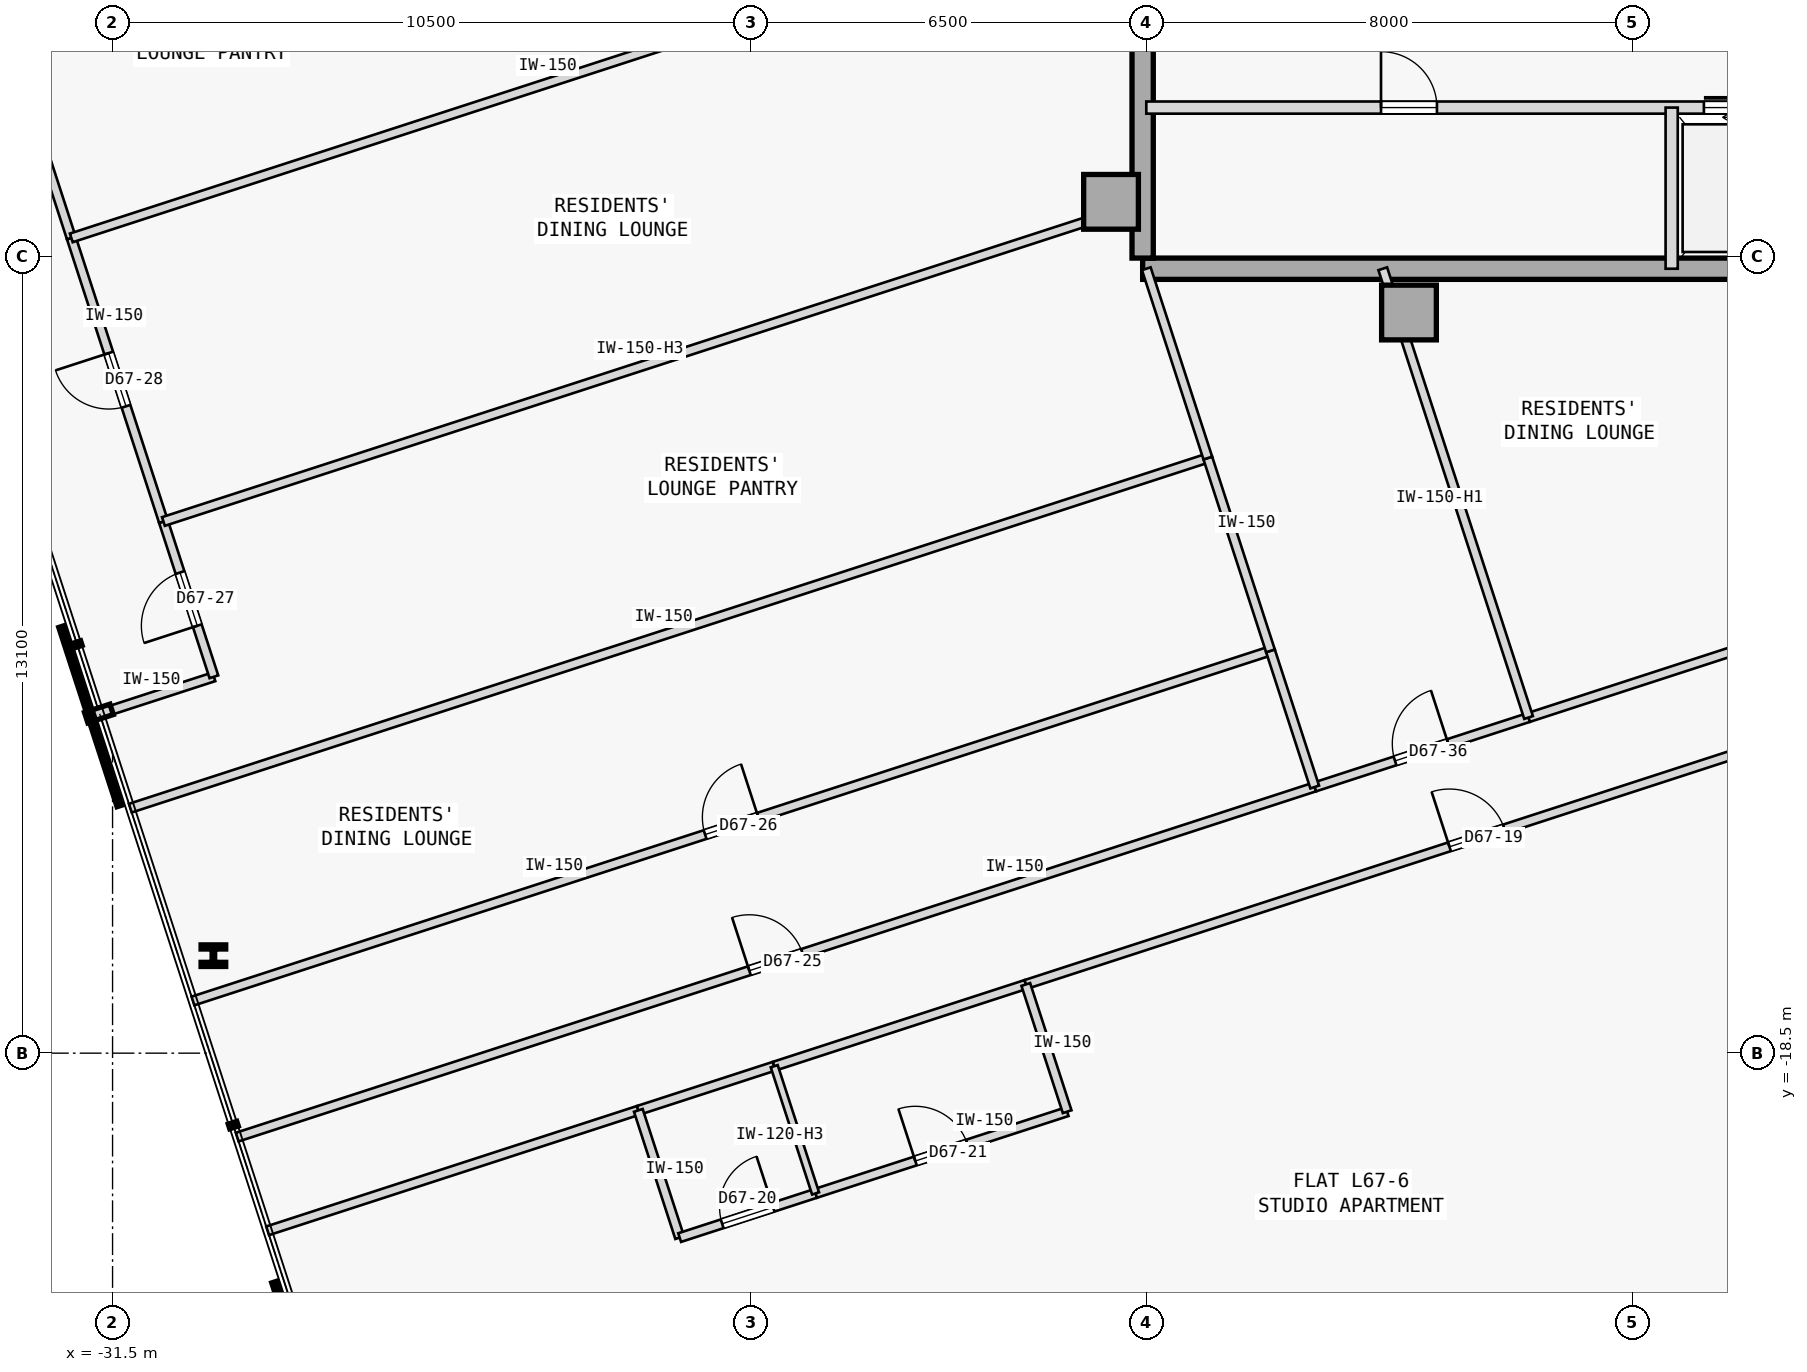
"""IFC4 building model, lengths in metres.
Left out: names, types, materials, properties, quantities, classifications, styles, units other than length and angle.
Written with IfcOpenShell. Run it as: python <this file> out.ifc"""

import sys

from ifc_helpers import new_model, si_unit, direction, frame, frame_2d, origin, origin_2d, place, context, subcontext, project, spatial, rectangle, i_section, extrude, element, fill, save


model = new_model("IFC4")
c1 = context("Model", 3, precision=1e-05, world=origin(), true_north=direction((0.0, 1.0)))
c2 = subcontext(c1, "Body", "Model", "MODEL_VIEW")
j1 = project(units=[si_unit("LENGTHUNIT", "METRE"), si_unit("PLANEANGLEUNIT", "RADIAN")], contexts=[c1])
p1 = place(None, origin())
s1 = spatial("IfcSite", under=j1, at=p1, CompositionType="ELEMENT")
p2 = place(p1, origin())
s2 = spatial("IfcBuilding", under=s1, at=p2, CompositionType="ELEMENT")
p3 = place(p2, frame((0.0, 0.0, 251.1)))
s3 = spatial("IfcBuildingStorey", under=s2, at=p3, CompositionType="ELEMENT", Elevation=251.1)
for number, where, z_axis, x_axis in (
    (1, (-15.08, -4.5, 0.0), (0.0, 0.0, 1.0), (1.0, 0.0, 0.0)),
    (2, (-10.18, -6.32, 0.0), (0.0, 0.0, 1.0), (1.0, 0.0, 0.0)),
):
    element("IfcColumn", number, at=place(p3, frame(where, z_axis=z_axis, x_axis=x_axis)), inside=s3, PredefinedType="COLUMN", context=c2, shape_type="SweptSolid", body=[
        extrude(rectangle(XDim=0.9, YDim=0.9, at=origin_2d()), origin(), (0.0, 0.0, 1.0), 3.35),
    ])
p4 = place(p3, frame((-14.56, -5.6, 0.0), z_axis=(0.0, 0.0, 1.0), x_axis=(1.0, 0.0, 0.0)))
e3 = element("IfcWall", 3, at=p4, inside=s3, PredefinedType="SHEAR", context=c2, shape_type="SweptSolid", body=[
    extrude(rectangle(XDim=10.86, YDim=0.35, at=frame_2d((5.43, 0.0))), origin(), (0.0, 0.0, 1.0), 2.95),
])
p5 = place(p3, frame((-14.56, -5.425, 0.0), z_axis=(0.0, 0.0, 1.0), x_axis=(0.0, 1.0, 0.0)))
e4 = element("IfcWall", 4, at=p5, inside=s3, PredefinedType="SHEAR", context=c2, shape_type="SweptSolid", body=[
    extrude(rectangle(XDim=10.85, YDim=0.35, at=frame_2d((5.425, 0.0))), origin(), (0.0, 0.0, 1.0), 2.95),
])
p6 = place(p3, frame((-29.842, -16.897, 0.0), z_axis=(0.0, 0.0, 1.0), x_axis=(1.0, 0.0, 0.0)))
e5 = element("IfcColumn", 5, at=p6, inside=s3, PredefinedType="COLUMN", context=c2, shape_type="SweptSolid", body=[
    extrude(i_section(OverallWidth=0.405, OverallDepth=0.355, WebThickness=0.042, FlangeThickness=0.068, FilletRadius=0.015, at=origin_2d()), origin(), (0.0, 0.0, 1.0), 3.35),
])
p7 = place(p3, frame((-14.5, -2.95, 0.0), z_axis=(0.0, 0.0, 1.0), x_axis=(1.0, 0.0, 0.0)))
e6 = element("IfcWall", 6, at=p7, inside=s3, PredefinedType="STANDARD", context=c2, shape_type="SweptSolid", body=[
    extrude(rectangle(XDim=10.8, YDim=0.2, at=frame_2d((5.4, 0.0))), origin(), (0.0, 0.0, 1.0), 2.95),
])
p8 = place(p7, frame((9.17, 0.0, 0.0)))
e7 = element("IfcOpeningElement", 7, at=p8, cuts=e6, PredefinedType="OPENING", context=c2, shape_type="SweptSolid", body=[
    extrude(rectangle(XDim=1.1, YDim=2.15, at=frame_2d((0.55, 1.075))), frame((0.0, 0.11, 0.0), z_axis=(0.0, -1.0, 0.0), x_axis=(1.0, 0.0, 0.0)), (0.0, 0.0, 1.0), 0.22),
])
p9 = place(p7, frame((3.86, 0.0, 0.0)))
e8 = element("IfcOpeningElement", 8, at=p9, cuts=e6, PredefinedType="OPENING", context=c2, shape_type="SweptSolid", body=[
    extrude(rectangle(XDim=0.92, YDim=2.15, at=frame_2d((0.46, 1.075))), frame((0.0, 0.11, 0.0), z_axis=(0.0, -1.0, 0.0), x_axis=(1.0, 0.0, 0.0)), (0.0, 0.0, 1.0), 0.22),
])
p10 = place(p3, frame((-5.86, -5.6, 0.0), z_axis=(0.0, 0.0, 1.0), x_axis=(0.0, 1.0, 0.0)))
e9 = element("IfcWall", 9, at=p10, inside=s3, PredefinedType="STANDARD", context=c2, shape_type="SweptSolid", body=[
    extrude(rectangle(XDim=2.65, YDim=0.2, at=frame_2d((1.325, 0.0))), origin(), (0.0, 0.0, 1.0), 2.95),
])
p11 = place(p3, frame((-28.95, -21.421, 0.0), z_axis=(0.0, 0.0, 1.0), x_axis=(0.951048062645, 0.309043010825, 0.0)))
e10 = element("IfcWall", 10, at=p11, inside=s3, PredefinedType="PARTITIONING", context=c2, shape_type="SweptSolid", body=[
    extrude(rectangle(XDim=6.41, YDim=0.15, at=frame_2d((3.205, 0.0))), origin(), (0.0, 0.0, 1.0), 2.95),
])
p12 = place(p3, frame((-16.482, -17.37, 0.0), z_axis=(0.0, 0.0, 1.0), x_axis=(0.9510563751, 0.309017428929, 0.0)))
e11 = element("IfcWall", 11, at=p12, inside=s3, PredefinedType="PARTITIONING", context=c2, shape_type="SweptSolid", body=[
    extrude(rectangle(XDim=15.602, YDim=0.15, at=frame_2d((7.801, 0.0))), origin(), (0.0, 0.0, 1.0), 2.95),
])
p13 = place(p12, frame((7.326, 0.0, 0.0)))
e12 = element("IfcOpeningElement", 12, at=p13, cuts=e11, PredefinedType="OPENING", context=c2, shape_type="SweptSolid", body=[
    extrude(rectangle(XDim=0.95, YDim=2.15, at=frame_2d((0.475, 1.075))), frame((0.0, 0.085, 0.0), z_axis=(0.0, -1.0, 0.0), x_axis=(1.0, 0.0, 0.0)), (0.0, 0.0, 1.0), 0.17),
])
p14 = place(p3, frame((-22.854, -19.44, 0.0), z_axis=(0.0, 0.0, 1.0), x_axis=(0.951076048914, 0.308956872689, 0.0)))
e13 = element("IfcWall", 13, at=p14, inside=s3, PredefinedType="PARTITIONING", context=c2, shape_type="SweptSolid", body=[
    extrude(rectangle(XDim=2.35, YDim=0.15, at=frame_2d((1.175, 0.0))), origin(), (0.0, 0.0, 1.0), 2.95),
])
p15 = place(p3, frame((-20.619, -18.714, 0.0), z_axis=(0.0, 0.0, 1.0), x_axis=(0.951052627573, 0.309028962374, 0.0)))
e14 = element("IfcWall", 14, at=p15, inside=s3, PredefinedType="PARTITIONING", context=c2, shape_type="SweptSolid", body=[
    extrude(rectangle(XDim=4.35, YDim=0.15, at=frame_2d((2.175, 0.0))), origin(), (0.0, 0.0, 1.0), 2.95),
])
p16 = place(p3, frame((-29.45, -19.881, 0.0), z_axis=(0.0, 0.0, 1.0), x_axis=(0.95105650271, 0.309017036186, 0.0)))
e15 = element("IfcWall", 15, at=p16, inside=s3, PredefinedType="PARTITIONING", context=c2, shape_type="SweptSolid", body=[
    extrude(rectangle(XDim=18.632, YDim=0.15, at=frame_2d((9.316, 0.0))), origin(), (0.0, 0.0, 1.0), 2.95),
])
p17 = place(p16, frame((8.856, 0.0, 0.0)))
e16 = element("IfcOpeningElement", 16, at=p17, cuts=e15, PredefinedType="OPENING", context=c2, shape_type="SweptSolid", body=[
    extrude(rectangle(XDim=0.92, YDim=2.15, at=frame_2d((0.46, 1.075))), frame((0.0, 0.085, 0.0), z_axis=(0.0, -1.0, 0.0), x_axis=(1.0, 0.0, 0.0)), (0.0, 0.0, 1.0), 0.17),
])
p18 = place(p3, frame((-31.712, -12.921, 0.0), z_axis=(0.0, 0.0, 1.0), x_axis=(0.951054051148, 0.309024581215, 0.0)))
e17 = element("IfcWall", 17, at=p18, inside=s3, PredefinedType="PARTITIONING", context=c2, shape_type="SweptSolid", body=[
    extrude(rectangle(XDim=1.975, YDim=0.15, at=frame_2d((0.988, 0.0))), origin(), (0.0, 0.0, 1.0), 2.95),
])
p19 = place(p3, frame((-29.833, -12.311, 0.0), z_axis=(0.0, 0.0, 1.0), x_axis=(-0.309044953986, 0.951047431213, 0.0)))
e18 = element("IfcWall", 18, at=p19, inside=s3, PredefinedType="PARTITIONING", context=c2, shape_type="SweptSolid", body=[
    extrude(rectangle(XDim=2.685, YDim=0.15, at=frame_2d((1.343, 0.0))), origin(), (0.0, 0.0, 1.0), 2.95),
])
p20 = place(p19, frame((0.883, 0.0, 0.0)))
e19 = element("IfcOpeningElement", 19, at=p20, cuts=e18, PredefinedType="OPENING", context=c2, shape_type="SweptSolid", body=[
    extrude(rectangle(XDim=0.92, YDim=2.15, at=frame_2d((0.46, 1.075))), frame((0.0, 0.085, 0.0), z_axis=(0.0, -1.0, 0.0), x_axis=(1.0, 0.0, 0.0)), (0.0, 0.0, 1.0), 0.17),
])
p21 = place(p3, frame((-30.663, -9.757, 0.0), z_axis=(0.0, 0.0, 1.0), x_axis=(-0.309019653166, 0.951055652397, 0.0)))
e20 = element("IfcWall", 20, at=p21, inside=s3, PredefinedType="PARTITIONING", context=c2, shape_type="SweptSolid", body=[
    extrude(rectangle(XDim=4.904, YDim=0.15, at=frame_2d((2.452, 0.0))), origin(), (0.0, 0.0, 1.0), 2.95),
])
p22 = place(p21, frame((1.992, 0.0, 0.0)))
e21 = element("IfcOpeningElement", 21, at=p22, cuts=e20, PredefinedType="OPENING", context=c2, shape_type="SweptSolid", body=[
    extrude(rectangle(XDim=0.92, YDim=2.15, at=frame_2d((0.46, 1.075))), frame((0.0, 0.085, 0.0), z_axis=(0.0, -1.0, 0.0), x_axis=(1.0, 0.0, 0.0)), (0.0, 0.0, 1.0), 0.17),
])
p23 = place(p3, frame((-32.179, -5.093, 0.0), z_axis=(0.0, 0.0, 1.0), x_axis=(-0.309014532869, 0.951057316083, 0.0)))
e22 = element("IfcWall", 22, at=p23, inside=s3, PredefinedType="PARTITIONING", context=c2, shape_type="SweptSolid", body=[
    extrude(rectangle(XDim=4.707, YDim=0.15, at=frame_2d((2.354, 0.0))), origin(), (0.0, 0.0, 1.0), 2.95),
])
p24 = place(p3, frame((-11.73, -14.123, 0.0), z_axis=(0.0, 0.0, 1.0), x_axis=(0.951052502763, 0.309029346483, 0.0)))
e23 = element("IfcWall", 23, at=p24, inside=s3, PredefinedType="PARTITIONING", context=c2, shape_type="SweptSolid", body=[
    extrude(rectangle(XDim=3.698, YDim=0.15, at=frame_2d((1.849, 0.0))), origin(), (0.0, 0.0, 1.0), 2.95),
])
p25 = place(p24, frame((1.389, 0.0, 0.0)))
e24 = element("IfcOpeningElement", 24, at=p25, cuts=e23, PredefinedType="OPENING", context=c2, shape_type="SweptSolid", body=[
    extrude(rectangle(XDim=0.92, YDim=2.15, at=frame_2d((0.46, 1.075))), frame((0.0, 0.085, 0.0), z_axis=(0.0, -1.0, 0.0), x_axis=(1.0, 0.0, 0.0)), (0.0, 0.0, 1.0), 0.17),
])
p26 = place(p3, frame((-8.213, -12.98, 0.0), z_axis=(0.0, 0.0, 1.0), x_axis=(0.951058260096, 0.309011627456, 0.0)))
e25 = element("IfcWall", 25, at=p26, inside=s3, PredefinedType="PARTITIONING", context=c2, shape_type="SweptSolid", body=[
    extrude(rectangle(XDim=4.746, YDim=0.15, at=frame_2d((2.373, 0.0))), origin(), (0.0, 0.0, 1.0), 2.95),
])
p27 = place(p3, frame((-22.174, -21.533, 0.0), z_axis=(0.0, 0.0, 1.0), x_axis=(-0.309028364152, 0.951052821956, 0.0)))
e26 = element("IfcWall", 26, at=p27, inside=s3, PredefinedType="PARTITIONING", context=c2, shape_type="SweptSolid", body=[
    extrude(rectangle(XDim=2.2, YDim=0.15, at=frame_2d((1.1, 0.0))), origin(), (0.0, 0.0, 1.0), 2.95),
])
p28 = place(p3, frame((-22.174, -21.533, 0.0), z_axis=(0.0, 0.0, 1.0), x_axis=(0.951045519245, 0.309050837767, 0.0)))
e27 = element("IfcWall", 27, at=p28, inside=s3, PredefinedType="PARTITIONING", context=c2, shape_type="SweptSolid", body=[
    extrude(rectangle(XDim=2.35, YDim=0.15, at=frame_2d((1.175, 0.0))), origin(), (0.0, 0.0, 1.0), 2.95),
])
p29 = place(p28, frame((0.735, 0.0, 0.0)))
e28 = element("IfcOpeningElement", 28, at=p29, cuts=e27, PredefinedType="OPENING", context=c2, shape_type="SweptSolid", body=[
    extrude(rectangle(XDim=0.88, YDim=2.15, at=frame_2d((0.44, 1.075))), frame((0.0, 0.085, 0.0), z_axis=(0.0, -1.0, 0.0), x_axis=(1.0, 0.0, 0.0)), (0.0, 0.0, 1.0), 0.17),
])
p30 = place(p3, frame((-19.939, -20.807, 0.0), z_axis=(0.0, 0.0, 1.0), x_axis=(0.951052627573, 0.309028962374, 0.0)))
e29 = element("IfcWall", 29, at=p30, inside=s3, PredefinedType="PARTITIONING", context=c2, shape_type="SweptSolid", body=[
    extrude(rectangle(XDim=4.35, YDim=0.15, at=frame_2d((2.175, 0.0))), origin(), (0.0, 0.0, 1.0), 2.95),
])
p31 = place(p30, frame((1.725, 0.0, 0.0)))
e30 = element("IfcOpeningElement", 30, at=p31, cuts=e29, PredefinedType="OPENING", context=c2, shape_type="SweptSolid", body=[
    extrude(rectangle(XDim=0.9, YDim=2.15, at=frame_2d((0.45, 1.075))), frame((0.0, 0.085, 0.0), z_axis=(0.0, -1.0, 0.0), x_axis=(1.0, 0.0, 0.0)), (0.0, 0.0, 1.0), 0.17),
])
p32 = place(p3, frame((-15.802, -19.462, 0.0), z_axis=(0.0, 0.0, 1.0), x_axis=(-0.309060979314, 0.951042223598, 0.0)))
e31 = element("IfcWall", 31, at=p32, inside=s3, PredefinedType="PARTITIONING", context=c2, shape_type="SweptSolid", body=[
    extrude(rectangle(XDim=2.2, YDim=0.15, at=frame_2d((1.1, 0.0))), origin(), (0.0, 0.0, 1.0), 2.95),
])
p33 = place(p3, frame((-19.939, -20.807, 0.0), z_axis=(0.0, 0.0, 1.0), x_axis=(-0.309060979314, 0.951042223598, 0.0)))
e32 = element("IfcWall", 32, at=p33, inside=s3, PredefinedType="PARTITIONING", context=c2, shape_type="SweptSolid", body=[
    extrude(rectangle(XDim=2.2, YDim=0.12, at=frame_2d((1.1, 0.0))), origin(), (0.0, 0.0, 1.0), 2.17),
])
p34 = place(p3, frame((-30.178, -17.642, 0.0), z_axis=(0.0, 0.0, 1.0), x_axis=(0.95105650271, 0.309017036186, 0.0)))
e33 = element("IfcWall", 33, at=p34, inside=s3, PredefinedType="PARTITIONING", context=c2, shape_type="SweptSolid", body=[
    extrude(rectangle(XDim=18.632, YDim=0.15, at=frame_2d((9.316, 0.0))), origin(), (0.0, 0.0, 1.0), 2.95),
])
p35 = place(p34, frame((8.856, 0.0, 0.0)))
e34 = element("IfcOpeningElement", 34, at=p35, cuts=e33, PredefinedType="OPENING", context=c2, shape_type="SweptSolid", body=[
    extrude(rectangle(XDim=0.92, YDim=2.15, at=frame_2d((0.46, 1.075))), frame((0.0, 0.085, 0.0), z_axis=(0.0, -1.0, 0.0), x_axis=(1.0, 0.0, 0.0)), (0.0, 0.0, 1.0), 0.17),
])
p36 = place(p3, frame((-11.73, -14.123, 0.0), z_axis=(0.0, 0.0, 1.0), x_axis=(-0.309062621189, 0.951041690035, 0.0)))
e35 = element("IfcWall", 35, at=p36, inside=s3, PredefinedType="PARTITIONING", context=c2, shape_type="SweptSolid", body=[
    extrude(rectangle(XDim=2.354, YDim=0.15, at=frame_2d((1.177, 0.0))), origin(), (0.0, 0.0, 1.0), 2.95),
])
p37 = place(p3, frame((-31.208, -14.471, 0.0), z_axis=(0.0, 0.0, 1.0), x_axis=(0.951057753948, 0.309013185244, 0.0)))
e36 = element("IfcWall", 36, at=p37, inside=s3, PredefinedType="PARTITIONING", context=c2, shape_type="SweptSolid", body=[
    extrude(rectangle(XDim=18.632, YDim=0.15, at=frame_2d((9.316, 0.0))), origin(), (0.0, 0.0, 1.0), 2.95),
])
p38 = place(p3, frame((-12.458, -11.884, 0.0), z_axis=(0.0, 0.0, 1.0), x_axis=(-0.308946982245, 0.951079261766, 0.0)))
e37 = element("IfcWall", 37, at=p38, inside=s3, PredefinedType="PARTITIONING", context=c2, shape_type="SweptSolid", body=[
    extrude(rectangle(XDim=3.334, YDim=0.15, at=frame_2d((1.667, 0.0))), origin(), (0.0, 0.0, 1.0), 2.95),
])
p39 = place(p3, frame((-30.663, -9.757, 0.0), z_axis=(0.0, 0.0, 1.0), x_axis=(0.951058192995, 0.309011833974, 0.0)))
e38 = element("IfcWall", 38, at=p39, inside=s3, PredefinedType="PARTITIONING", context=c2, shape_type="SweptSolid", body=[
    extrude(rectangle(XDim=16.657, YDim=0.15, at=frame_2d((8.329, 0.0))), origin(), (0.0, 0.0, 1.0), 2.17),
])
p40 = place(p3, frame((-13.488, -8.713, 0.0), z_axis=(0.0, 0.0, 1.0), x_axis=(-0.309082700143, 0.951035164687, 0.0)))
e39 = element("IfcWall", 39, at=p40, inside=s3, PredefinedType="PARTITIONING", context=c2, shape_type="SweptSolid", body=[
    extrude(rectangle(XDim=3.274, YDim=0.15, at=frame_2d((1.637, 0.0))), origin(), (0.0, 0.0, 1.0), 2.95),
])
p41 = place(p3, frame((-32.179, -5.093, 0.0), z_axis=(0.0, 0.0, 1.0), x_axis=(0.951053885426, 0.309025091239, 0.0)))
e40 = element("IfcWall", 40, at=p41, inside=s3, PredefinedType="PARTITIONING", context=c2, shape_type="SweptSolid", body=[
    extrude(rectangle(XDim=16.657, YDim=0.15, at=frame_2d((8.329, 0.0))), origin(), (0.0, 0.0, 1.0), 2.95),
])
p42 = place(p3, frame((-8.213, -12.98, 0.0), z_axis=(0.0, 0.0, 1.0), x_axis=(-0.309017065592, 0.951056493155, 0.0)))
e41 = element("IfcWall", 41, at=p42, inside=s3, PredefinedType="PARTITIONING", context=c2, shape_type="SweptSolid", body=[
    extrude(rectangle(XDim=7.76, YDim=0.15, at=frame_2d((3.88, 0.0))), origin(), (0.0, 0.0, 1.0), 2.5),
])
p43 = place(p8, origin())
e42 = element("IfcDoor", 42, at=p43, inside=s3, OperationType="SLIDING_TO_RIGHT", PredefinedType="DOOR", context=c2, shape_type="SweptSolid", body=[
    extrude(rectangle(XDim=1.1, YDim=2.15, at=frame_2d((0.55, 1.075))), frame((0.0, 0.025, 0.0), z_axis=(0.0, -1.0, 0.0), x_axis=(1.0, 0.0, 0.0)), (0.0, 0.0, 1.0), 0.05),
])
fill(e7, e42)
p44 = place(p9, origin())
e43 = element("IfcDoor", 43, at=p44, inside=s3, OperationType="SINGLE_SWING_LEFT", PredefinedType="DOOR", context=c2, shape_type="SweptSolid", body=[
    extrude(rectangle(XDim=0.92, YDim=2.15, at=frame_2d((0.46, 1.075))), frame((0.0, 0.025, 0.0), z_axis=(0.0, -1.0, 0.0), x_axis=(1.0, 0.0, 0.0)), (0.0, 0.0, 1.0), 0.05),
])
fill(e8, e43)
p45 = place(p13, origin())
e44 = element("IfcDoor", 44, at=p45, inside=s3, OperationType="SINGLE_SWING_LEFT", PredefinedType="DOOR", context=c2, shape_type="SweptSolid", body=[
    extrude(rectangle(XDim=0.95, YDim=2.15, at=frame_2d((0.475, 1.075))), frame((0.0, 0.025, 0.0), z_axis=(0.0, -1.0, 0.0), x_axis=(1.0, 0.0, 0.0)), (0.0, 0.0, 1.0), 0.05),
])
fill(e12, e44)
p46 = place(p29, origin())
e45 = element("IfcDoor", 45, at=p46, inside=s3, OperationType="SINGLE_SWING_RIGHT", PredefinedType="DOOR", context=c2, shape_type="SweptSolid", body=[
    extrude(rectangle(XDim=0.88, YDim=2.15, at=frame_2d((0.44, 1.075))), frame((0.0, 0.025, 0.0), z_axis=(0.0, -1.0, 0.0), x_axis=(1.0, 0.0, 0.0)), (0.0, 0.0, 1.0), 0.05),
])
fill(e28, e45)
p47 = place(p31, origin())
e46 = element("IfcDoor", 46, at=p47, inside=s3, OperationType="SINGLE_SWING_LEFT", PredefinedType="DOOR", context=c2, shape_type="SweptSolid", body=[
    extrude(rectangle(XDim=0.9, YDim=2.15, at=frame_2d((0.45, 1.075))), frame((0.0, 0.025, 0.0), z_axis=(0.0, -1.0, 0.0), x_axis=(1.0, 0.0, 0.0)), (0.0, 0.0, 1.0), 0.05),
])
fill(e30, e46)
p48 = place(p17, origin())
e47 = element("IfcDoor", 47, at=p48, inside=s3, OperationType="SINGLE_SWING_LEFT", PredefinedType="DOOR", context=c2, shape_type="SweptSolid", body=[
    extrude(rectangle(XDim=0.92, YDim=2.15, at=frame_2d((0.46, 1.075))), frame((0.0, 0.025, 0.0), z_axis=(0.0, -1.0, 0.0), x_axis=(1.0, 0.0, 0.0)), (0.0, 0.0, 1.0), 0.05),
])
fill(e16, e47)
p49 = place(p35, origin())
e48 = element("IfcDoor", 48, at=p49, inside=s3, OperationType="SINGLE_SWING_RIGHT", PredefinedType="DOOR", context=c2, shape_type="SweptSolid", body=[
    extrude(rectangle(XDim=0.92, YDim=2.15, at=frame_2d((0.46, 1.075))), frame((0.0, 0.025, 0.0), z_axis=(0.0, -1.0, 0.0), x_axis=(1.0, 0.0, 0.0)), (0.0, 0.0, 1.0), 0.05),
])
fill(e34, e48)
p50 = place(p20, origin())
e49 = element("IfcDoor", 49, at=p50, inside=s3, OperationType="SINGLE_SWING_LEFT", PredefinedType="DOOR", context=c2, shape_type="SweptSolid", body=[
    extrude(rectangle(XDim=0.92, YDim=2.15, at=frame_2d((0.46, 1.075))), frame((0.0, 0.025, 0.0), z_axis=(0.0, -1.0, 0.0), x_axis=(1.0, 0.0, 0.0)), (0.0, 0.0, 1.0), 0.05),
])
fill(e19, e49)
p51 = place(p22, origin())
e50 = element("IfcDoor", 50, at=p51, inside=s3, OperationType="SINGLE_SWING_RIGHT", PredefinedType="DOOR", context=c2, shape_type="SweptSolid", body=[
    extrude(rectangle(XDim=0.92, YDim=2.15, at=frame_2d((0.46, 1.075))), frame((0.0, 0.025, 0.0), z_axis=(0.0, -1.0, 0.0), x_axis=(1.0, 0.0, 0.0)), (0.0, 0.0, 1.0), 0.05),
])
fill(e21, e50)
p52 = place(p25, origin())
e51 = element("IfcDoor", 51, at=p52, inside=s3, OperationType="SINGLE_SWING_RIGHT", PredefinedType="DOOR", context=c2, shape_type="SweptSolid", body=[
    extrude(rectangle(XDim=0.92, YDim=2.15, at=frame_2d((0.46, 1.075))), frame((0.0, 0.025, 0.0), z_axis=(0.0, -1.0, 0.0), x_axis=(1.0, 0.0, 0.0)), (0.0, 0.0, 1.0), 0.05),
])
fill(e24, e51)
save(model, sys.argv[1])
